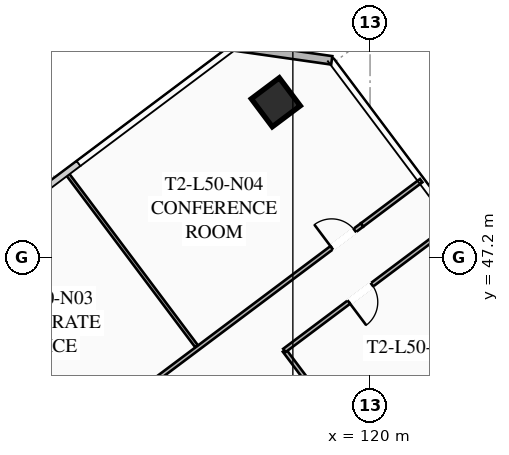
"""IFC4 building model, lengths in metres.
Left out: names, types, materials, properties, quantities, classifications, styles, units other than length and angle.
Written with IfcOpenShell. Run it as: python <this file> out.ifc"""

import sys

from ifc_helpers import new_model, si_unit, direction, frame, frame_2d, origin, origin_2d, place, context, subcontext, project, spatial, rectangle, hollow_rectangle, extrude, element, fill, save


model = new_model("IFC4")
c1 = context("Model", 3, precision=1e-05, world=origin(), true_north=direction((0.0, 1.0)))
c2 = subcontext(c1, "Body", "Model", "MODEL_VIEW")
j1 = project(units=[si_unit("LENGTHUNIT", "METRE"), si_unit("PLANEANGLEUNIT", "RADIAN")], contexts=[c1])
p1 = place(None, origin())
s1 = spatial("IfcSite", under=j1, at=p1, CompositionType="ELEMENT")
p2 = place(p1, origin())
s2 = spatial("IfcBuilding", under=s1, at=p2, CompositionType="ELEMENT")
p3 = place(p2, frame((0.0, 0.0, 185.4)))
s3 = spatial("IfcBuildingStorey", under=s2, at=p3, CompositionType="ELEMENT", Elevation=185.4)
p4 = place(p3, frame((116.9, 52.3, 0.0), z_axis=(0.0, 0.0, 1.0), x_axis=(0.799999996291, 0.600000004945, 0.0)))
e1 = element("IfcColumn", 1, at=p4, inside=s3, PredefinedType="COLUMN", context=c2, shape_type="SweptSolid", body=[
    extrude(hollow_rectangle(XDim=1.15, YDim=1.15, WallThickness=0.045, at=origin_2d()), origin(), (0.0, 0.0, 1.0), 3.37),
])
p5 = place(p3, frame((115.52, 54.14, 0.0), z_axis=(0.0, 0.0, 1.0), x_axis=(0.989950994782, -0.141410847992, 0.0)))
e2 = element("IfcWall", 2, at=p5, inside=s3, PredefinedType="SOLIDWALL", context=c2, shape_type="SweptSolid", body=[
    extrude(rectangle(XDim=3.253, YDim=0.28, at=frame_2d((1.626, 0.0))), origin(), (0.0, 0.0, 1.0), 3.37),
])
p6 = place(p3, frame((119.824, 40.618, 0.0), z_axis=(0.0, 0.0, 1.0), x_axis=(-0.599982243973, 0.800013316712, 0.0)))
e3 = element("IfcWall", 3, at=p6, inside=s3, PredefinedType="PARTITIONING", context=c2, shape_type="SweptSolid", body=[
    extrude(rectangle(XDim=4.4, YDim=0.135, at=frame_2d((2.2, 0.0))), origin(), (0.0, 0.0, 1.0), 2.723),
])
p7 = place(p3, frame((96.778, 31.046, 0.0), z_axis=(0.0, 0.0, 1.0), x_axis=(0.799995916807, 0.600005444218, 0.0)))
e4 = element("IfcWall", 4, at=p7, inside=s3, PredefinedType="PARTITIONING", context=c2, shape_type="SweptSolid", body=[
    extrude(rectangle(XDim=28.7, YDim=0.135, at=frame_2d((14.35, 0.0))), origin(), (0.0, 0.0, 1.0), 2.723),
])
p8 = place(p7, frame((0.3, 0.0, 0.0)))
e5 = element("IfcOpeningElement", 5, at=p8, cuts=e4, PredefinedType="OPENING", context=c2, shape_type="SweptSolid", body=[
    extrude(rectangle(XDim=0.95, YDim=2.05, at=frame_2d((0.475, 1.025))), frame((0.0, 0.077, 0.0), z_axis=(0.0, -1.0, 0.0), x_axis=(1.0, 0.0, 0.0)), (0.0, 0.0, 1.0), 0.155),
])
p9 = place(p7, frame((13.82, 0.0, 0.0)))
e6 = element("IfcOpeningElement", 6, at=p9, cuts=e4, PredefinedType="OPENING", context=c2, shape_type="SweptSolid", body=[
    extrude(rectangle(XDim=0.95, YDim=2.05, at=frame_2d((0.475, 1.025))), frame((0.0, 0.077, 0.0), z_axis=(0.0, -1.0, 0.0), x_axis=(1.0, 0.0, 0.0)), (0.0, 0.0, 1.0), 0.155),
])
p10 = place(p7, frame((17.821, 0.0, 0.0)))
e7 = element("IfcOpeningElement", 7, at=p10, cuts=e4, PredefinedType="OPENING", context=c2, shape_type="SweptSolid", body=[
    extrude(rectangle(XDim=0.95, YDim=2.05, at=frame_2d((0.475, 1.025))), frame((0.0, 0.077, 0.0), z_axis=(0.0, -1.0, 0.0), x_axis=(1.0, 0.0, 0.0)), (0.0, 0.0, 1.0), 0.155),
])
p11 = place(p7, frame((27.45, 0.0, 0.0)))
e8 = element("IfcOpeningElement", 8, at=p11, cuts=e4, PredefinedType="OPENING", context=c2, shape_type="SweptSolid", body=[
    extrude(rectangle(XDim=0.95, YDim=2.05, at=frame_2d((0.475, 1.025))), frame((0.0, 0.077, 0.0), z_axis=(0.0, -1.0, 0.0), x_axis=(1.0, 0.0, 0.0)), (0.0, 0.0, 1.0), 0.155),
])
p12 = place(p3, frame((119.738, 48.266, 0.0), z_axis=(0.0, 0.0, 1.0), x_axis=(0.799975885537, 0.600032151272, 0.0)))
e9 = element("IfcWall", 9, at=p12, inside=s3, PredefinedType="PARTITIONING", context=c2, shape_type="SweptSolid", body=[
    extrude(rectangle(XDim=2.43, YDim=0.135, at=frame_2d((1.215, 0.0))), origin(), (0.0, 0.0, 1.0), 2.723),
])
p13 = place(p3, frame((114.29, 44.28, 0.0), z_axis=(0.0, 0.0, 1.0), x_axis=(-0.600016435865, 0.799987672837, 0.0)))
e10 = element("IfcWall", 10, at=p13, inside=s3, PredefinedType="PARTITIONING", context=c2, shape_type="SweptSolid", body=[
    extrude(rectangle(XDim=7.13, YDim=0.11, at=frame_2d((3.565, 0.0))), origin(), (0.0, 0.0, 1.0), 2.723),
])
p14 = place(p3, frame((122.624, 48.218, 0.0), z_axis=(0.0, 0.0, 1.0), x_axis=(-0.79999138319, -0.600011488909, 0.0)))
e11 = element("IfcWall", 11, at=p14, inside=s3, PredefinedType="PARTITIONING", context=c2, shape_type="SweptSolid", body=[
    extrude(rectangle(XDim=6.8, YDim=0.135, at=frame_2d((3.4, 0.0))), origin(), (0.0, 0.0, 1.0), 2.723),
])
p15 = place(p14, frame((3.2, 0.0, 0.0)))
e12 = element("IfcOpeningElement", 12, at=p15, cuts=e11, PredefinedType="OPENING", context=c2, shape_type="SweptSolid", body=[
    extrude(rectangle(XDim=0.95, YDim=2.05, at=frame_2d((0.475, 1.025))), frame((0.0, 0.077, 0.0), z_axis=(0.0, -1.0, 0.0), x_axis=(1.0, 0.0, 0.0)), (0.0, 0.0, 1.0), 0.155),
])
p16 = place(p3, frame((125.264, 44.698, 0.0), z_axis=(0.0, 0.0, 1.0), x_axis=(-0.8, -0.6, 0.0)))
e13 = element("IfcWall", 13, at=p16, inside=s3, PredefinedType="PARTITIONING", context=c2, shape_type="SweptSolid", body=[
    extrude(rectangle(XDim=4.95, YDim=0.11, at=frame_2d((2.475, 0.0))), origin(), (0.0, 0.0, 1.0), 2.723),
])
p17 = place(p11, origin())
e14 = element("IfcDoor", 14, at=p17, inside=s3, OperationType="SINGLE_SWING_LEFT", PredefinedType="DOOR", context=c2, shape_type="SweptSolid", body=[
    extrude(rectangle(XDim=0.95, YDim=2.05, at=frame_2d((0.475, 1.025))), frame((0.0, 0.025, 0.0), z_axis=(0.0, -1.0, 0.0), x_axis=(1.0, 0.0, 0.0)), (0.0, 0.0, 1.0), 0.05),
])
fill(e8, e14)
p18 = place(p15, origin())
e15 = element("IfcDoor", 15, at=p18, inside=s3, OperationType="SINGLE_SWING_RIGHT", PredefinedType="DOOR", context=c2, shape_type="SweptSolid", body=[
    extrude(rectangle(XDim=0.95, YDim=2.05, at=frame_2d((0.475, 1.025))), frame((0.0, 0.025, 0.0), z_axis=(0.0, -1.0, 0.0), x_axis=(1.0, 0.0, 0.0)), (0.0, 0.0, 1.0), 0.05),
])
fill(e12, e15)
save(model, sys.argv[1])
